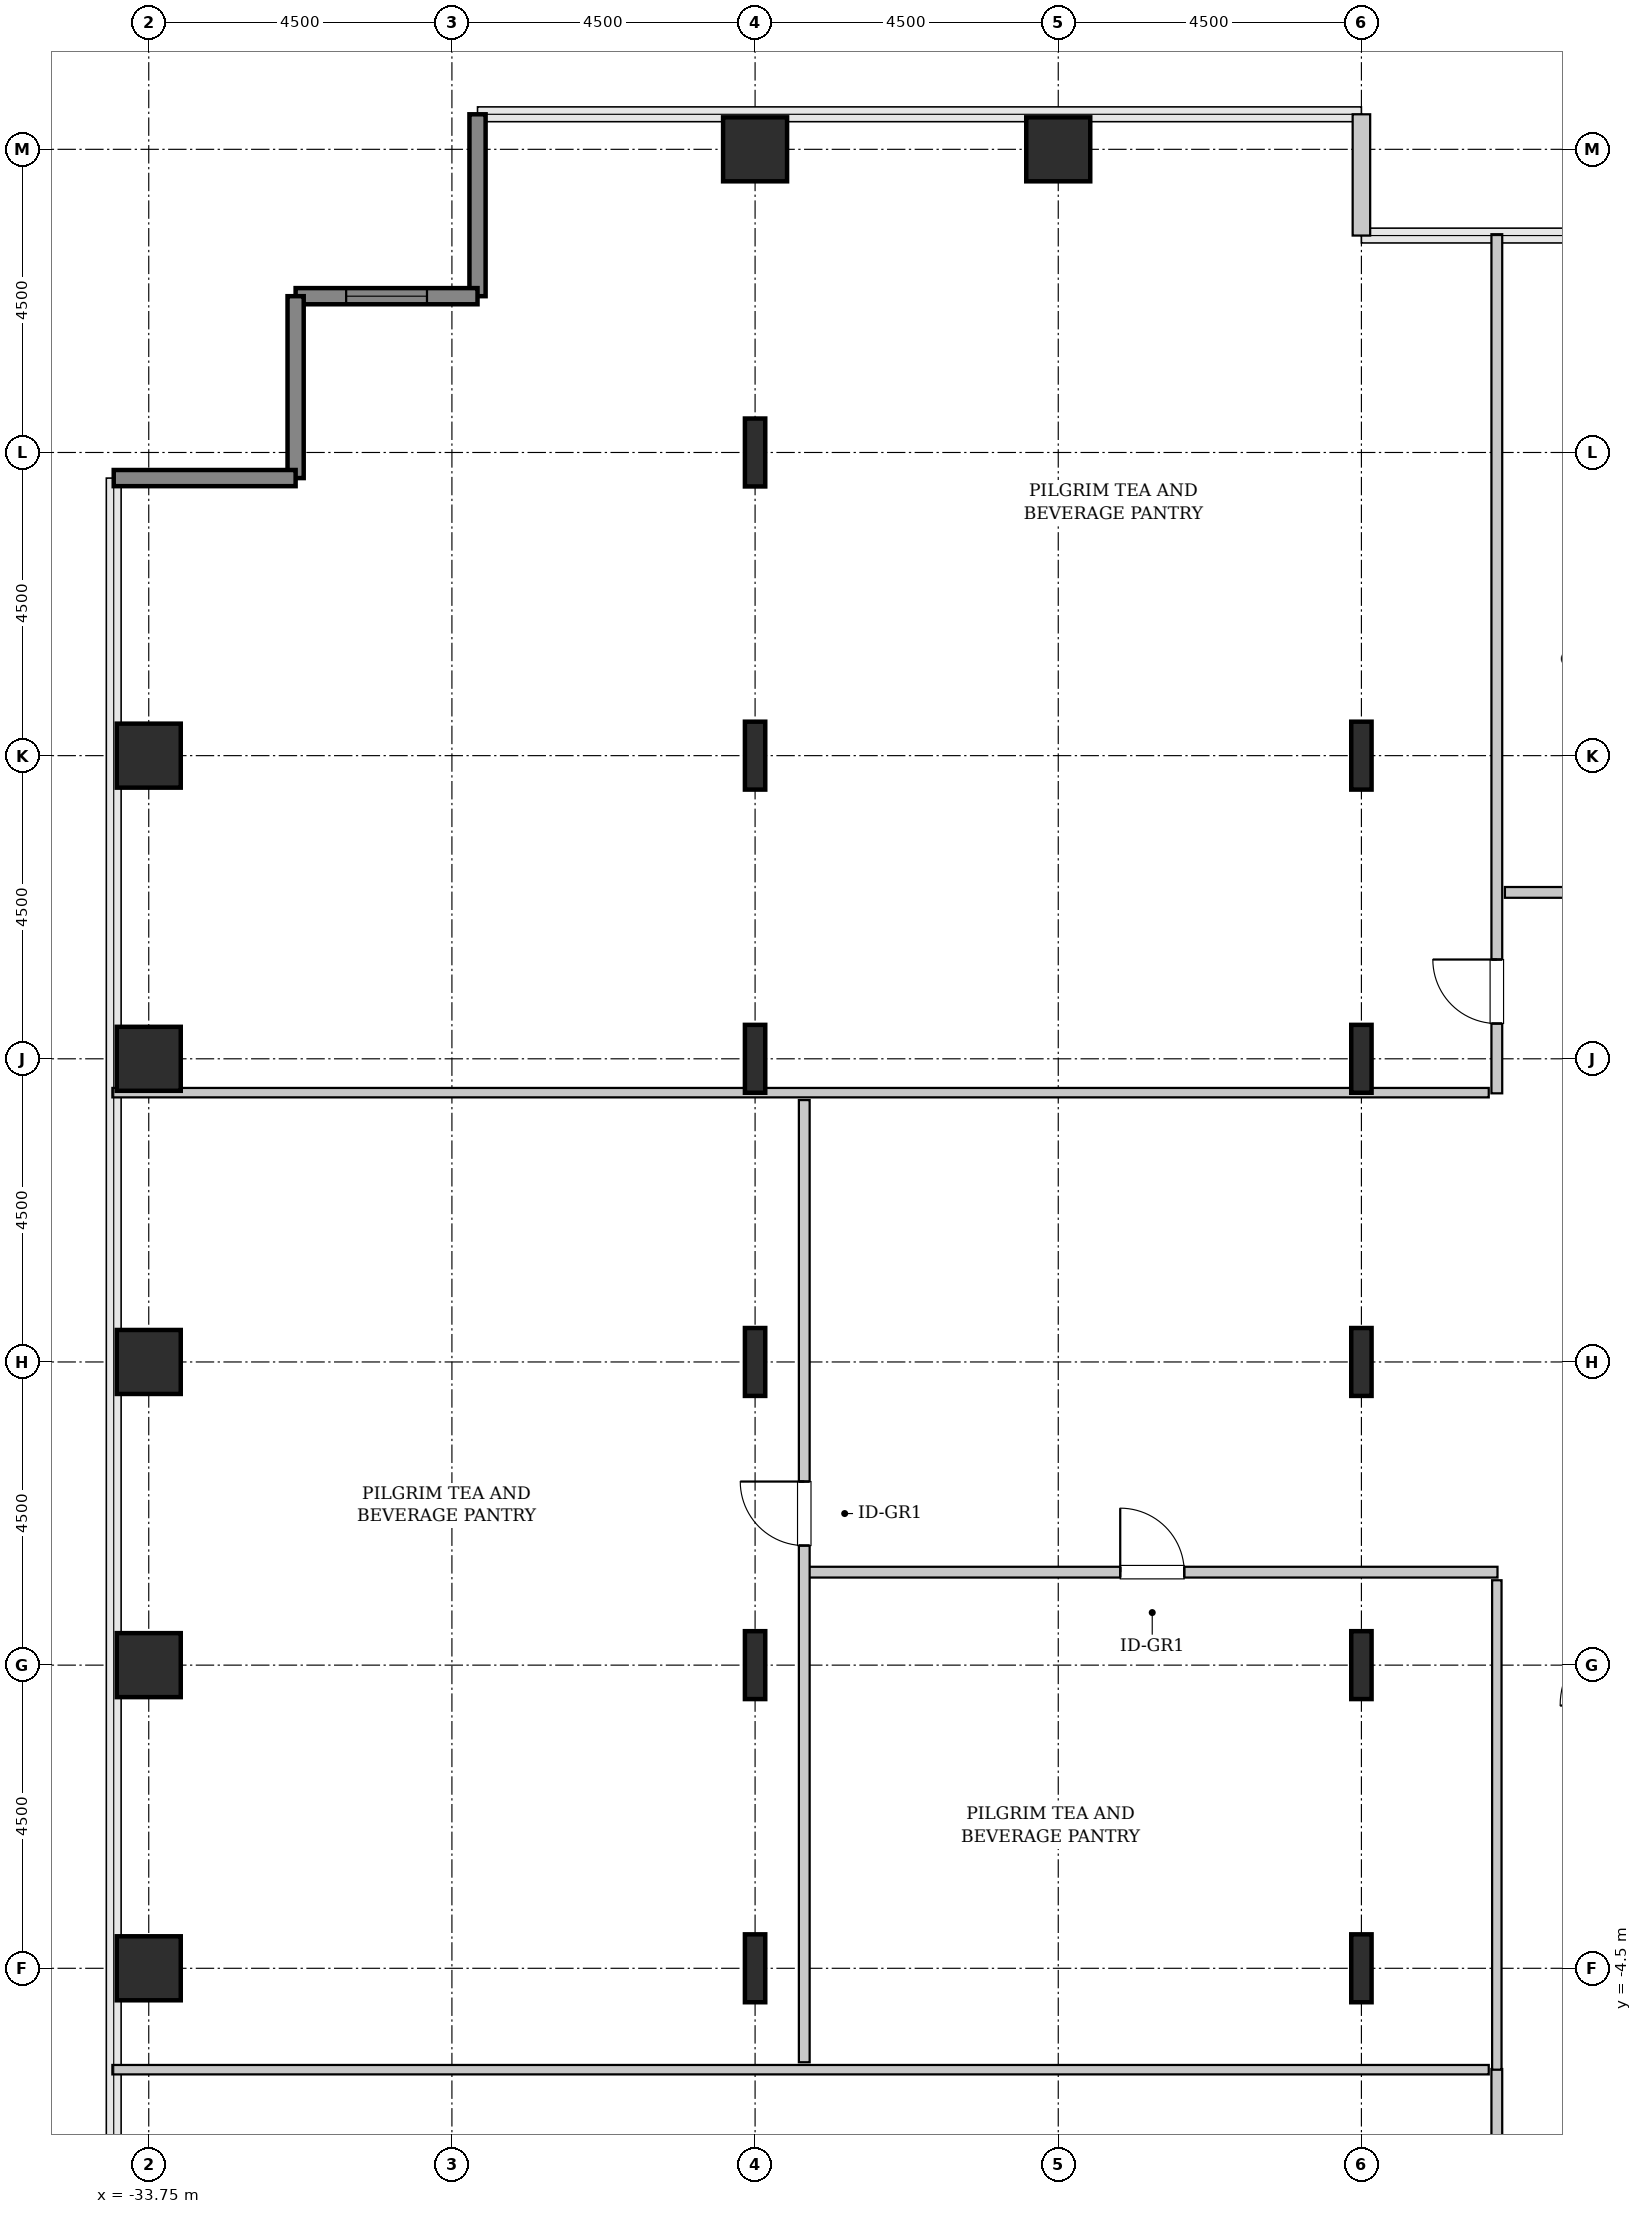
"""IFC4 building model, lengths in metres.
Left out: names, types, materials, properties, quantities, classifications, styles, units other than length and angle.
Written with IfcOpenShell. Run it as: python <this file> out.ifc"""

import sys

from ifc_helpers import new_model, si_unit, direction, frame, frame_2d, origin, origin_2d, place, context, subcontext, project, spatial, rectangle, hollow_rectangle, i_section, extrude, source, transform, mapped, element, fill, save


model = new_model("IFC4")
c1 = context("Model", 3, precision=1e-05, world=origin(), true_north=direction((0.0, 1.0)))
c2 = subcontext(c1, "Body", "Model", "MODEL_VIEW")
j1 = project(units=[si_unit("LENGTHUNIT", "METRE"), si_unit("PLANEANGLEUNIT", "RADIAN")], contexts=[c1])
p1 = place(None, origin())
s1 = spatial("IfcSite", under=j1, at=p1, CompositionType="ELEMENT")
p2 = place(p1, origin())
s2 = spatial("IfcBuilding", under=s1, at=p2, CompositionType="ELEMENT")
p3 = place(p2, frame((0.0, 0.0, 59.6)))
s3 = spatial("IfcBuildingStorey", under=s2, at=p3, CompositionType="ELEMENT", Elevation=59.6)
m1 = source(origin(), c2, "Body", "SweptSolid", [
    extrude(hollow_rectangle(XDim=0.95, YDim=0.95, WallThickness=0.045, InnerFilletRadius=0.045, OuterFilletRadius=0.09, at=origin_2d()), origin(), (0.0, 0.0, 1.0), 3.8),
])
for number, where, z_axis, x_axis in (
    (1, (-33.75, -4.5, 0.0), (0.0, 0.0, 1.0), (1.0, 0.0, 0.0)),
    (2, (-33.75, 0.0, 0.0), (0.0, 0.0, 1.0), (1.0, 0.0, 0.0)),
    (3, (-33.75, 4.5, 0.0), (0.0, 0.0, 1.0), (1.0, 0.0, 0.0)),
    (4, (-33.75, 9.0, 0.0), (0.0, 0.0, 1.0), (1.0, 0.0, 0.0)),
    (5, (-33.75, 13.5, 0.0), (0.0, 0.0, 1.0), (1.0, 0.0, 0.0)),
):
    element("IfcColumn", number, at=place(p3, frame(where, z_axis=z_axis, x_axis=x_axis)), inside=s3, PredefinedType="COLUMN", context=c2, shape_type="MappedRepresentation", body=[
        mapped(m1, transform((0.0, 0.0, 0.0), x_axis=(1.0, 0.0, 0.0), y_axis=(0.0, 1.0, 0.0), z_axis=(0.0, 0.0, 1.0), scale=1.0)),
    ])
m2 = source(origin(), c2, "Body", "SweptSolid", [
    extrude(i_section(OverallWidth=0.302, OverallDepth=1.008, WebThickness=0.021, FlangeThickness=0.04, FilletRadius=0.03, at=origin_2d()), origin(), (0.0, 0.0, 1.0), 3.8),
])
for number, where, z_axis, x_axis in (
    (6, (-24.75, -4.5, 0.0), (0.0, 0.0, 1.0), (1.0, 0.0, 0.0)),
    (7, (-24.75, 0.0, 0.0), (0.0, 0.0, 1.0), (1.0, 0.0, 0.0)),
    (8, (-24.75, 4.5, 0.0), (0.0, 0.0, 1.0), (1.0, 0.0, 0.0)),
    (9, (-24.75, 9.0, 0.0), (0.0, 0.0, 1.0), (1.0, 0.0, 0.0)),
    (10, (-24.75, 13.5, 0.0), (0.0, 0.0, 1.0), (1.0, 0.0, 0.0)),
    (11, (-24.75, 18.0, 0.0), (0.0, 0.0, 1.0), (1.0, 0.0, 0.0)),
):
    element("IfcColumn", number, at=place(p3, frame(where, z_axis=z_axis, x_axis=x_axis)), inside=s3, PredefinedType="COLUMN", context=c2, shape_type="MappedRepresentation", body=[
        mapped(m2, transform((0.0, 0.0, 0.0), x_axis=(1.0, 0.0, 0.0), y_axis=(0.0, 1.0, 0.0), z_axis=(0.0, 0.0, 1.0), scale=1.0)),
    ])
for number, where, z_axis, x_axis in (
    (12, (-24.75, 22.5, 0.0), (0.0, 0.0, 1.0), (1.0, 0.0, 0.0)),
    (13, (-20.25, 22.5, 0.0), (0.0, 0.0, 1.0), (1.0, 0.0, 0.0)),
):
    element("IfcColumn", number, at=place(p3, frame(where, z_axis=z_axis, x_axis=x_axis)), inside=s3, PredefinedType="COLUMN", context=c2, shape_type="MappedRepresentation", body=[
        mapped(m1, transform((0.0, 0.0, 0.0), x_axis=(1.0, 0.0, 0.0), y_axis=(0.0, 1.0, 0.0), z_axis=(0.0, 0.0, 1.0), scale=1.0)),
    ])
for number, where, z_axis, x_axis in (
    (14, (-15.75, -4.5, 0.0), (0.0, 0.0, 1.0), (1.0, 0.0, 0.0)),
    (15, (-15.75, 0.0, 0.0), (0.0, 0.0, 1.0), (1.0, 0.0, 0.0)),
    (16, (-15.75, 4.5, 0.0), (0.0, 0.0, 1.0), (1.0, 0.0, 0.0)),
    (17, (-15.75, 9.0, 0.0), (0.0, 0.0, 1.0), (1.0, 0.0, 0.0)),
    (18, (-15.75, 13.5, 0.0), (0.0, 0.0, 1.0), (1.0, 0.0, 0.0)),
):
    element("IfcColumn", number, at=place(p3, frame(where, z_axis=z_axis, x_axis=x_axis)), inside=s3, PredefinedType="COLUMN", context=c2, shape_type="MappedRepresentation", body=[
        mapped(m2, transform((0.0, 0.0, 0.0), x_axis=(1.0, 0.0, 0.0), y_axis=(0.0, 1.0, 0.0), z_axis=(0.0, 0.0, 1.0), scale=1.0)),
    ])
m3 = source(origin(), c2, "Body", "SweptSolid", [
    extrude(rectangle(XDim=1.8, YDim=0.26, at=frame_2d((0.9, 0.0))), origin(), (0.0, 0.0, 1.0), 3.55),
])
p4 = place(p3, frame((-15.75, 21.22, 0.0), z_axis=(0.0, 0.0, 1.0), x_axis=(0.0, 1.0, 0.0)))
e19 = element("IfcWall", 19, at=p4, inside=s3, PredefinedType="SOLIDWALL", context=c2, shape_type="MappedRepresentation", body=[
    mapped(m3, transform((0.0, 0.0, 0.0), x_axis=(1.0, 0.0, 0.0), y_axis=(0.0, 1.0, 0.0), z_axis=(0.0, 0.0, 1.0), scale=1.0)),
])
m4 = source(origin(), c2, "Body", "SweptSolid", [
    extrude(rectangle(XDim=2.7, YDim=0.24, at=frame_2d((1.35, 0.0))), origin(), (0.0, 0.0, 1.0), 3.55),
])
p5 = place(p3, frame((-28.87, 23.02, 0.0), z_axis=(0.0, 0.0, 1.0), x_axis=(0.0, -1.0, 0.0)))
e20 = element("IfcWall", 20, at=p5, inside=s3, PredefinedType="SHEAR", context=c2, shape_type="MappedRepresentation", body=[
    mapped(m4, transform((0.0, 0.0, 0.0), x_axis=(1.0, 0.0, 0.0), y_axis=(0.0, 1.0, 0.0), z_axis=(0.0, 0.0, 1.0), scale=1.0)),
])
p6 = place(p3, frame((-28.87, 20.32, 0.0), z_axis=(0.0, 0.0, 1.0), x_axis=(-1.0, 0.0, 0.0)))
e21 = element("IfcWall", 21, at=p6, inside=s3, PredefinedType="SHEAR", context=c2, shape_type="MappedRepresentation", body=[
    mapped(m4, transform((0.0, 0.0, 0.0), x_axis=(1.0, 0.0, 0.0), y_axis=(0.0, 1.0, 0.0), z_axis=(0.0, 0.0, 1.0), scale=1.0)),
])
p7 = place(p6, frame((0.75, 0.0, 0.85)))
e22 = element("IfcOpeningElement", 22, at=p7, cuts=e21, PredefinedType="OPENING", context=c2, shape_type="SweptSolid", body=[
    extrude(rectangle(XDim=1.2, YDim=1.8, at=frame_2d((0.6, 0.9))), frame((0.0, 0.13, 0.0), z_axis=(0.0, -1.0, 0.0), x_axis=(1.0, 0.0, 0.0)), (0.0, 0.0, 1.0), 0.26),
])
for number, where, z_axis, x_axis in (
    (23, (-31.57, 20.32, 0.0), (0.0, 0.0, 1.0), (0.0, -1.0, 0.0)),
    (24, (-31.57, 17.62, 0.0), (0.0, 0.0, 1.0), (-1.0, 0.0, 0.0)),
):
    element("IfcWall", number, at=place(p3, frame(where, z_axis=z_axis, x_axis=x_axis)), inside=s3, PredefinedType="SHEAR", context=c2, shape_type="MappedRepresentation", body=[
        mapped(m4, transform((0.0, 0.0, 0.0), x_axis=(1.0, 0.0, 0.0), y_axis=(0.0, 1.0, 0.0), z_axis=(0.0, 0.0, 1.0), scale=1.0)),
    ])
m5 = source(origin(), c2, "Body", "SweptSolid", [
    extrude(rectangle(XDim=15.245, YDim=0.16, at=frame_2d((7.623, 0.0))), origin(), (0.0, 0.0, 1.0), 3.535),
])
p8 = place(p3, frame((-13.74, -21.24, 0.0), z_axis=(0.0, 0.0, 1.0), x_axis=(0.0, 1.0, 0.0)))
e25 = element("IfcWall", 25, at=p8, inside=s3, PredefinedType="PARTITIONING", context=c2, shape_type="MappedRepresentation", body=[
    mapped(m5, transform((0.0, 0.0, 0.0), x_axis=(1.0, 0.0, 0.0), y_axis=(0.0, 1.0, 0.0), z_axis=(0.0, 0.0, 1.0), scale=1.0)),
])
p9 = place(p8, frame((12.012, 0.0, 0.0)))
e26 = element("IfcOpeningElement", 26, at=p9, cuts=e25, PredefinedType="OPENING", context=c2, shape_type="SweptSolid", body=[
    extrude(rectangle(XDim=0.95, YDim=2.1, at=frame_2d((0.475, 1.05))), frame((0.0, 0.09, 0.0), z_axis=(0.0, -1.0, 0.0), x_axis=(1.0, 0.0, 0.0)), (0.0, 0.0, 1.0), 0.18),
])
m6 = source(origin(), c2, "Body", "SweptSolid", [
    extrude(rectangle(XDim=20.43, YDim=0.14, at=frame_2d((10.215, 0.0))), origin(), (0.0, 0.0, 1.0), 3.535),
])
p10 = place(p3, frame((-34.29, -6.005, 0.0), z_axis=(0.0, 0.0, 1.0), x_axis=(1.0, 0.0, 0.0)))
e27 = element("IfcWall", 27, at=p10, inside=s3, PredefinedType="PARTITIONING", context=c2, shape_type="MappedRepresentation", body=[
    mapped(m6, transform((0.0, 0.0, 0.0), x_axis=(1.0, 0.0, 0.0), y_axis=(0.0, 1.0, 0.0), z_axis=(0.0, 0.0, 1.0), scale=1.0)),
])
m7 = source(origin(), c2, "Body", "SweptSolid", [
    extrude(rectangle(XDim=12.752, YDim=0.16, at=frame_2d((6.376, 0.0))), origin(), (0.0, 0.0, 1.0), 3.535),
])
p11 = place(p3, frame((-13.74, 8.488, 0.0), z_axis=(0.0, 0.0, 1.0), x_axis=(0.0, 1.0, 0.0)))
e28 = element("IfcWall", 28, at=p11, inside=s3, PredefinedType="PARTITIONING", context=c2, shape_type="MappedRepresentation", body=[
    mapped(m7, transform((0.0, 0.0, 0.0), x_axis=(1.0, 0.0, 0.0), y_axis=(0.0, 1.0, 0.0), z_axis=(0.0, 0.0, 1.0), scale=1.0)),
])
p12 = place(p11, frame((1.036, 0.0, 0.0)))
e29 = element("IfcOpeningElement", 29, at=p12, cuts=e28, PredefinedType="OPENING", context=c2, shape_type="SweptSolid", body=[
    extrude(rectangle(XDim=0.95, YDim=2.1, at=frame_2d((0.475, 1.05))), frame((0.0, 0.09, 0.0), z_axis=(0.0, -1.0, 0.0), x_axis=(1.0, 0.0, 0.0)), (0.0, 0.0, 1.0), 0.18),
])
m8 = source(origin(), c2, "Body", "SweptSolid", [
    extrude(rectangle(XDim=20.43, YDim=0.14, at=frame_2d((10.215, 0.0))), origin(), (0.0, 0.0, 1.0), 2.825),
])
p13 = place(p3, frame((-34.29, 8.498, 0.0), z_axis=(0.0, 0.0, 1.0), x_axis=(1.0, 0.0, 0.0)))
e30 = element("IfcWall", 30, at=p13, inside=s3, PredefinedType="PARTITIONING", context=c2, shape_type="MappedRepresentation", body=[
    mapped(m8, transform((0.0, 0.0, 0.0), x_axis=(1.0, 0.0, 0.0), y_axis=(0.0, 1.0, 0.0), z_axis=(0.0, 0.0, 1.0), scale=1.0)),
])
m9 = source(origin(), c2, "Body", "SweptSolid", [
    extrude(rectangle(XDim=10.25, YDim=0.16, at=frame_2d((5.125, 0.0))), origin(), (0.0, 0.0, 1.0), 3.535),
])
p14 = place(p3, frame((-23.98, 1.38, 0.0), z_axis=(0.0, 0.0, 1.0), x_axis=(1.0, 0.0, 0.0)))
e31 = element("IfcWall", 31, at=p14, inside=s3, PredefinedType="PARTITIONING", context=c2, shape_type="MappedRepresentation", body=[
    mapped(m9, transform((0.0, 0.0, 0.0), x_axis=(1.0, 0.0, 0.0), y_axis=(0.0, 1.0, 0.0), z_axis=(0.0, 0.0, 1.0), scale=1.0)),
])
p15 = place(p14, frame((4.65, 0.0, 0.0)))
e32 = element("IfcOpeningElement", 32, at=p15, cuts=e31, PredefinedType="OPENING", context=c2, shape_type="SweptSolid", body=[
    extrude(rectangle(XDim=0.95, YDim=2.1, at=frame_2d((0.475, 1.05))), frame((0.0, 0.09, 0.0), z_axis=(0.0, -1.0, 0.0), x_axis=(1.0, 0.0, 0.0)), (0.0, 0.0, 1.0), 0.18),
])
m10 = source(origin(), c2, "Body", "SweptSolid", [
    extrude(rectangle(XDim=7.265, YDim=0.14, at=frame_2d((3.632, 0.0))), origin(), (0.0, 0.0, 1.0), 3.535),
])
p16 = place(p3, frame((-13.74, -6.005, 0.0), z_axis=(0.0, 0.0, 1.0), x_axis=(0.0, 1.0, 0.0)))
e33 = element("IfcWall", 33, at=p16, inside=s3, PredefinedType="PARTITIONING", context=c2, shape_type="MappedRepresentation", body=[
    mapped(m10, transform((0.0, 0.0, 0.0), x_axis=(1.0, 0.0, 0.0), y_axis=(0.0, 1.0, 0.0), z_axis=(0.0, 0.0, 1.0), scale=1.0)),
])
m11 = source(origin(), c2, "Body", "SweptSolid", [
    extrude(rectangle(XDim=14.282, YDim=0.16, at=frame_2d((7.141, 0.0))), origin(), (0.0, 0.0, 1.0), 3.535),
])
p17 = place(p3, frame((-24.02, -5.895, 0.0), z_axis=(0.0, 0.0, 1.0), x_axis=(0.0, 1.0, 0.0)))
e34 = element("IfcWall", 34, at=p17, inside=s3, PredefinedType="PARTITIONING", context=c2, shape_type="MappedRepresentation", body=[
    mapped(m11, transform((0.0, 0.0, 0.0), x_axis=(1.0, 0.0, 0.0), y_axis=(0.0, 1.0, 0.0), z_axis=(0.0, 0.0, 1.0), scale=1.0)),
])
p18 = place(p17, frame((7.67, 0.0, 0.0)))
e35 = element("IfcOpeningElement", 35, at=p18, cuts=e34, PredefinedType="OPENING", context=c2, shape_type="SweptSolid", body=[
    extrude(rectangle(XDim=0.95, YDim=2.1, at=frame_2d((0.475, 1.05))), frame((0.0, 0.09, 0.0), z_axis=(0.0, -1.0, 0.0), x_axis=(1.0, 0.0, 0.0)), (0.0, 0.0, 1.0), 0.18),
])
m12 = source(origin(), c2, "Body", "SweptSolid", [
    extrude(rectangle(XDim=4.125, YDim=0.16, at=frame_2d((2.062, 0.0))), origin(), (0.0, 0.0, 1.0), 3.535),
])
p19 = place(p3, frame((-13.62, 11.47, 0.0), z_axis=(0.0, 0.0, 1.0), x_axis=(1.0, 0.0, 0.0)))
e36 = element("IfcWall", 36, at=p19, inside=s3, PredefinedType="PARTITIONING", context=c2, shape_type="MappedRepresentation", body=[
    mapped(m12, transform((0.0, 0.0, 0.0), x_axis=(1.0, 0.0, 0.0), y_axis=(0.0, 1.0, 0.0), z_axis=(0.0, 0.0, 1.0), scale=1.0)),
])
p20 = place(p19, frame((1.587, 0.0, 0.0)))
e37 = element("IfcOpeningElement", 37, at=p20, cuts=e36, PredefinedType="OPENING", context=c2, shape_type="SweptSolid", body=[
    extrude(rectangle(XDim=0.95, YDim=2.1, at=frame_2d((0.475, 1.05))), frame((0.0, 0.09, 0.0), z_axis=(0.0, -1.0, 0.0), x_axis=(1.0, 0.0, 0.0)), (0.0, 0.0, 1.0), 0.18),
])
m13 = source(origin(), c2, "Body", "SweptSolid", [
    extrude(rectangle(XDim=1.2, YDim=1.8, at=frame_2d((0.6, 0.9))), frame((0.0, 0.03, 0.0), z_axis=(0.0, -1.0, 0.0), x_axis=(1.0, 0.0, 0.0)), (0.0, 0.0, 1.0), 0.06),
])
p21 = place(p7, origin())
e38 = element("IfcWindow", 38, at=p21, inside=s3, PartitioningType="SINGLE_PANEL", PredefinedType="WINDOW", context=c2, shape_type="MappedRepresentation", body=[
    mapped(m13, transform((0.0, 0.0, 0.0), x_axis=(1.0, 0.0, 0.0), y_axis=(0.0, 1.0, 0.0), z_axis=(0.0, 0.0, 1.0), scale=1.0)),
])
fill(e22, e38)
m14 = source(origin(), c2, "Body", "SweptSolid", [
    extrude(rectangle(XDim=0.95, YDim=2.1, at=frame_2d((0.475, 1.05))), frame((0.0, 0.025, 0.0), z_axis=(0.0, -1.0, 0.0), x_axis=(1.0, 0.0, 0.0)), (0.0, 0.0, 1.0), 0.05),
])
p22 = place(p12, origin())
e39 = element("IfcDoor", 39, at=p22, inside=s3, OperationType="SINGLE_SWING_RIGHT", PredefinedType="DOOR", context=c2, shape_type="MappedRepresentation", body=[
    mapped(m14, transform((0.0, 0.0, 0.0), x_axis=(1.0, 0.0, 0.0), y_axis=(0.0, 1.0, 0.0), z_axis=(0.0, 0.0, 1.0), scale=1.0)),
])
fill(e29, e39)
p23 = place(p15, origin())
e40 = element("IfcDoor", 40, at=p23, inside=s3, OperationType="SINGLE_SWING_LEFT", PredefinedType="DOOR", context=c2, shape_type="MappedRepresentation", body=[
    mapped(m14, transform((0.0, 0.0, 0.0), x_axis=(1.0, 0.0, 0.0), y_axis=(0.0, 1.0, 0.0), z_axis=(0.0, 0.0, 1.0), scale=1.0)),
])
fill(e32, e40)
p24 = place(p18, origin())
e41 = element("IfcDoor", 41, at=p24, inside=s3, OperationType="SINGLE_SWING_RIGHT", PredefinedType="DOOR", context=c2, shape_type="MappedRepresentation", body=[
    mapped(m14, transform((0.0, 0.0, 0.0), x_axis=(1.0, 0.0, 0.0), y_axis=(0.0, 1.0, 0.0), z_axis=(0.0, 0.0, 1.0), scale=1.0)),
])
fill(e35, e41)
save(model, sys.argv[1])
